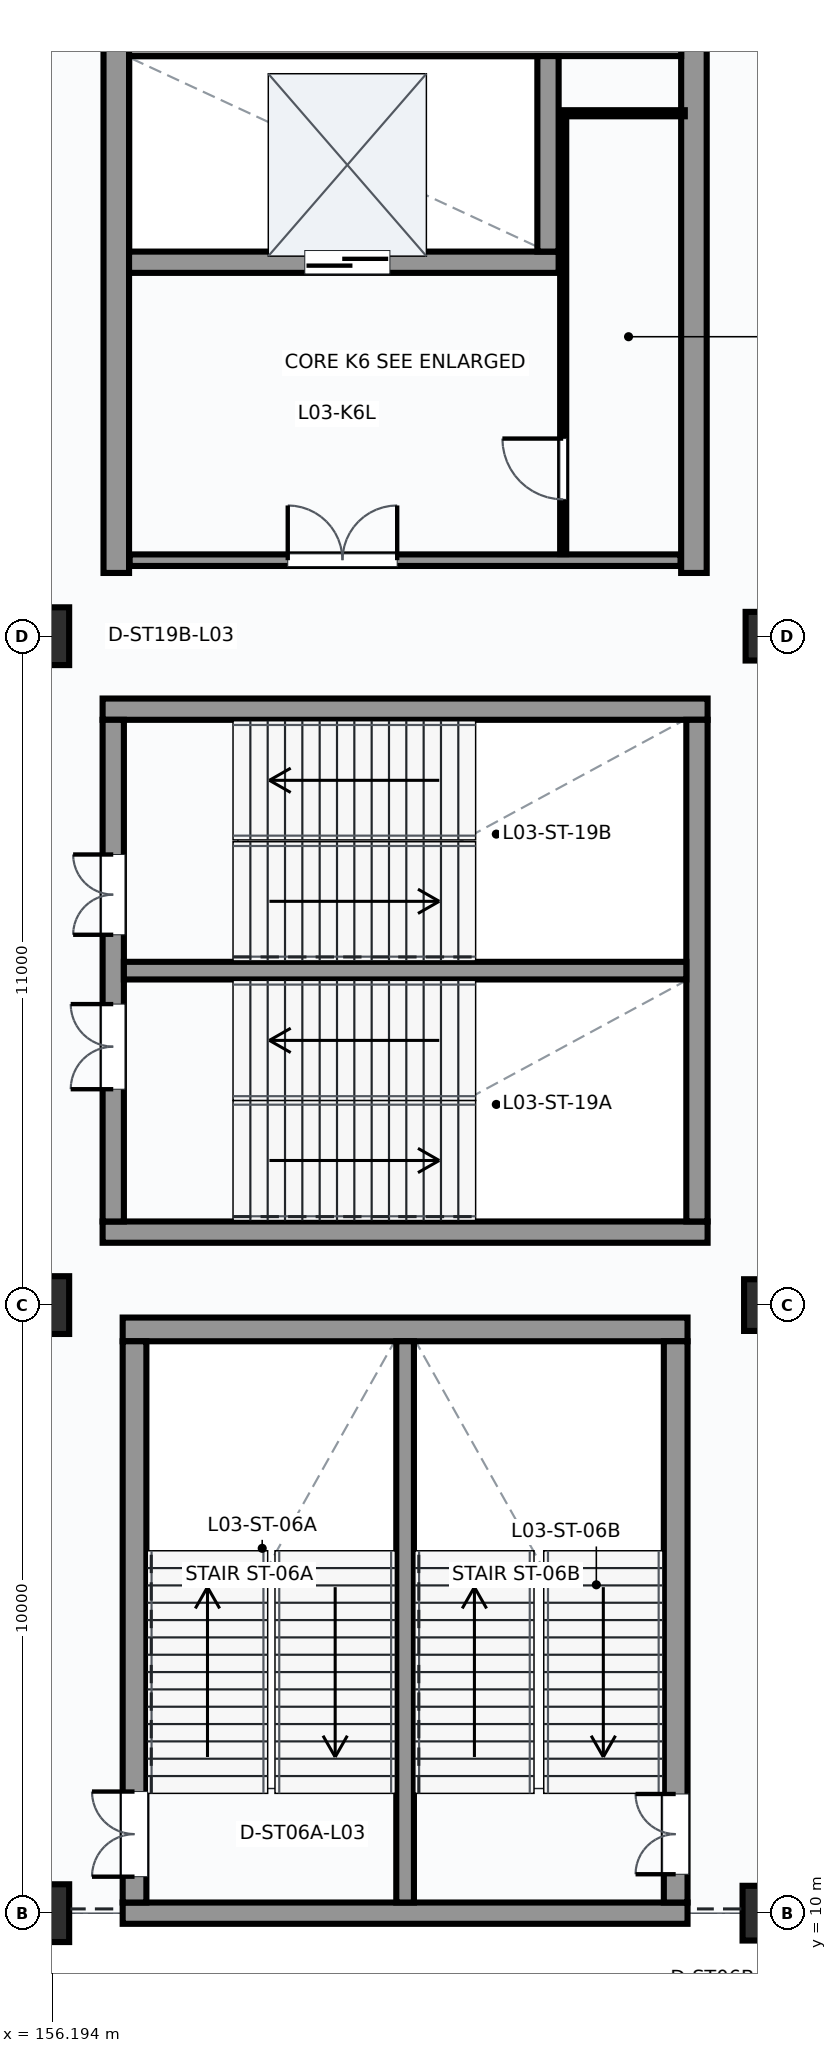
"""IFC4 building model, lengths in metres.
Left out: names, types, materials, properties, quantities, classifications, styles, units other than length and angle.
Written with IfcOpenShell. Run it as: python <this file> out.ifc"""

import sys

from ifc_helpers import new_model, si_unit, direction, frame, frame_2d, origin, origin_2d, place, context, subcontext, project, spatial, rectangle, extrude, element, fill, save


model = new_model("IFC4")
c1 = context("Model", 3, precision=1e-05, world=origin(), true_north=direction((0.0, 1.0)))
c2 = subcontext(c1, "Body", "Model", "MODEL_VIEW")
j1 = project(units=[si_unit("LENGTHUNIT", "METRE"), si_unit("PLANEANGLEUNIT", "RADIAN")], contexts=[c1])
p1 = place(None, origin())
s1 = spatial("IfcSite", under=j1, at=p1, CompositionType="ELEMENT")
p2 = place(p1, origin())
s2 = spatial("IfcBuilding", under=s1, at=p2, CompositionType="ELEMENT")
p3 = place(p2, frame((0.0, 0.0, 14.7)))
s3 = spatial("IfcBuildingStorey", under=s2, at=p3, CompositionType="ELEMENT", Elevation=14.7)
for number, where, z_axis, x_axis in (
    (1, (156.0, 10.0, 0.0), (0.0, 0.0, 1.0), (1.0, 0.0, 0.0)),
    (2, (156.0, 20.0, 0.0), (0.0, 0.0, 1.0), (1.0, 0.0, 0.0)),
    (3, (156.0, 31.0, 0.0), (0.0, 0.0, 1.0), (1.0, 0.0, 0.0)),
):
    element("IfcColumn", number, at=place(p3, frame(where, z_axis=z_axis, x_axis=x_axis)), inside=s3, PredefinedType="COLUMN", context=c2, shape_type="SweptSolid", body=[
        extrude(rectangle(XDim=0.95, YDim=0.95, at=origin_2d()), origin(), (0.0, 0.0, 1.0), 4.5),
    ])
p4 = place(p3, frame((168.0, 10.0, 0.0), z_axis=(0.0, 0.0, 1.0), x_axis=(1.0, 0.0, 0.0)))
e4 = element("IfcColumn", 4, at=p4, inside=s3, PredefinedType="COLUMN", context=c2, shape_type="SweptSolid", body=[
    extrude(rectangle(XDim=0.9, YDim=0.9, at=origin_2d()), origin(), (0.0, 0.0, 1.0), 4.5),
])
p5 = place(p3, frame((168.0, 20.0, 0.0), z_axis=(0.0, 0.0, 1.0), x_axis=(1.0, 0.0, 0.0)))
e5 = element("IfcColumn", 5, at=p5, inside=s3, PredefinedType="COLUMN", context=c2, shape_type="SweptSolid", body=[
    extrude(rectangle(XDim=0.85, YDim=0.85, at=origin_2d()), origin(), (0.0, 0.0, 1.0), 4.5),
])
p6 = place(p3, frame((168.0, 31.0, 0.0), z_axis=(0.0, 0.0, 1.0), x_axis=(1.0, 0.0, 0.0)))
e6 = element("IfcColumn", 6, at=p6, inside=s3, PredefinedType="COLUMN", context=c2, shape_type="SweptSolid", body=[
    extrude(rectangle(XDim=0.8, YDim=0.8, at=origin_2d()), origin(), (0.0, 0.0, 1.0), 4.5),
])
p7 = place(p3, frame((157.355, 10.0, 0.0), z_axis=(0.0, 0.0, 1.0), x_axis=(1.0, 0.0, 0.0)))
e7 = element("IfcWall", 7, at=p7, inside=s3, PredefinedType="SHEAR", context=c2, shape_type="SweptSolid", body=[
    extrude(rectangle(XDim=9.29, YDim=0.35, at=frame_2d((4.645, 0.0))), origin(), (0.0, 0.0, 1.0), 3.674),
])
p8 = place(p3, frame((157.355, 19.6, 0.0), z_axis=(0.0, 0.0, 1.0), x_axis=(1.0, 0.0, 0.0)))
e8 = element("IfcWall", 8, at=p8, inside=s3, PredefinedType="SHEAR", context=c2, shape_type="SweptSolid", body=[
    extrude(rectangle(XDim=9.29, YDim=0.39, at=frame_2d((4.645, 0.0))), origin(), (0.0, 0.0, 1.0), 4.5),
])
p9 = place(p3, frame((157.55, 10.175, 0.0), z_axis=(0.0, 0.0, 1.0), x_axis=(0.0, 1.0, 0.0)))
e9 = element("IfcWall", 9, at=p9, inside=s3, PredefinedType="SHEAR", context=c2, shape_type="SweptSolid", body=[
    extrude(rectangle(XDim=9.23, YDim=0.39, at=frame_2d((4.615, 0.0))), origin(), (0.0, 0.0, 1.0), 4.5),
])
p10 = place(p9, frame((0.425, 0.0, 0.0)))
e10 = element("IfcOpeningElement", 10, at=p10, cuts=e9, PredefinedType="OPENING", context=c2, shape_type="SweptSolid", body=[
    extrude(rectangle(XDim=1.4, YDim=2.2, at=frame_2d((0.7, 1.1))), frame((0.0, 0.205, 0.0), z_axis=(0.0, -1.0, 0.0), x_axis=(1.0, 0.0, 0.0)), (0.0, 0.0, 1.0), 0.41),
])
p11 = place(p3, frame((166.45, 10.175, 0.0), z_axis=(0.0, 0.0, 1.0), x_axis=(0.0, 1.0, 0.0)))
e11 = element("IfcWall", 11, at=p11, inside=s3, PredefinedType="SHEAR", context=c2, shape_type="SweptSolid", body=[
    extrude(rectangle(XDim=9.23, YDim=0.39, at=frame_2d((4.615, 0.0))), origin(), (0.0, 0.0, 1.0), 4.5),
])
p12 = place(p11, frame((0.465, 0.0, 0.0)))
e12 = element("IfcOpeningElement", 12, at=p12, cuts=e11, PredefinedType="OPENING", context=c2, shape_type="SweptSolid", body=[
    extrude(rectangle(XDim=1.32, YDim=2.2, at=frame_2d((0.66, 1.1))), frame((0.0, 0.205, 0.0), z_axis=(0.0, -1.0, 0.0), x_axis=(1.0, 0.0, 0.0)), (0.0, 0.0, 1.0), 0.41),
])
p13 = place(p3, frame((162.0, 10.175, 0.0), z_axis=(0.0, 0.0, 1.0), x_axis=(0.0, 1.0, 0.0)))
e13 = element("IfcWall", 13, at=p13, inside=s3, PredefinedType="SHEAR", context=c2, shape_type="SweptSolid", body=[
    extrude(rectangle(XDim=9.23, YDim=0.29, at=frame_2d((4.615, 0.0))), origin(), (0.0, 0.0, 1.0), 4.5),
])
for number, where, z_axis, x_axis in (
    (14, (157.025, 21.2, 0.0), (0.0, 0.0, 1.0), (1.0, 0.0, 0.0)),
    (15, (157.025, 29.8, 0.0), (0.0, 0.0, 1.0), (1.0, 0.0, 0.0)),
):
    element("IfcWall", number, at=place(p3, frame(where, z_axis=z_axis, x_axis=x_axis)), inside=s3, PredefinedType="SHEAR", context=c2, shape_type="SweptSolid", body=[
        extrude(rectangle(XDim=9.95, YDim=0.35, at=frame_2d((4.975, 0.0))), origin(), (0.0, 0.0, 1.0), 4.5),
    ])
p14 = place(p3, frame((157.2, 21.375, 0.0), z_axis=(0.0, 0.0, 1.0), x_axis=(0.0, 1.0, 0.0)))
e16 = element("IfcWall", 16, at=p14, inside=s3, PredefinedType="SHEAR", context=c2, shape_type="SweptSolid", body=[
    extrude(rectangle(XDim=8.25, YDim=0.35, at=frame_2d((4.125, 0.0))), origin(), (0.0, 0.0, 1.0), 4.5),
])
p15 = place(p14, frame((2.175, 0.0, 0.0)))
e17 = element("IfcOpeningElement", 17, at=p15, cuts=e16, PredefinedType="OPENING", context=c2, shape_type="SweptSolid", body=[
    extrude(rectangle(XDim=1.4, YDim=2.2, at=frame_2d((0.7, 1.1))), frame((0.0, 0.185, 0.0), z_axis=(0.0, -1.0, 0.0), x_axis=(1.0, 0.0, 0.0)), (0.0, 0.0, 1.0), 0.37),
])
p16 = place(p14, frame((4.715, 0.0, 0.0)))
e18 = element("IfcOpeningElement", 18, at=p16, cuts=e16, PredefinedType="OPENING", context=c2, shape_type="SweptSolid", body=[
    extrude(rectangle(XDim=1.32, YDim=2.2, at=frame_2d((0.66, 1.1))), frame((0.0, 0.185, 0.0), z_axis=(0.0, -1.0, 0.0), x_axis=(1.0, 0.0, 0.0)), (0.0, 0.0, 1.0), 0.37),
])
p17 = place(p3, frame((166.8, 21.375, 0.0), z_axis=(0.0, 0.0, 1.0), x_axis=(0.0, 1.0, 0.0)))
e19 = element("IfcWall", 19, at=p17, inside=s3, PredefinedType="SHEAR", context=c2, shape_type="SweptSolid", body=[
    extrude(rectangle(XDim=8.25, YDim=0.35, at=frame_2d((4.125, 0.0))), origin(), (0.0, 0.0, 1.0), 4.5),
])
p18 = place(p3, frame((157.375, 25.5, 0.0), z_axis=(0.0, 0.0, 1.0), x_axis=(1.0, 0.0, 0.0)))
e20 = element("IfcWall", 20, at=p18, inside=s3, PredefinedType="SHEAR", context=c2, shape_type="SweptSolid", body=[
    extrude(rectangle(XDim=9.25, YDim=0.29, at=frame_2d((4.625, 0.0))), origin(), (0.0, 0.0, 1.0), 4.5),
])
for number, where, z_axis, x_axis in (
    (21, (157.25, 32.04, 0.0), (0.0, 0.0, 1.0), (0.0, 1.0, 0.0)),
    (22, (166.75, 32.04, 0.0), (0.0, 0.0, 1.0), (0.0, 1.0, 0.0)),
):
    element("IfcWall", number, at=place(p3, frame(where, z_axis=z_axis, x_axis=x_axis)), inside=s3, PredefinedType="SHEAR", context=c2, shape_type="SweptSolid", body=[
        extrude(rectangle(XDim=8.92, YDim=0.42, at=frame_2d((4.46, 0.0))), origin(), (0.0, 0.0, 1.0), 4.5),
    ])
p19 = place(p3, frame((157.46, 40.75, 0.0), z_axis=(0.0, 0.0, 1.0), x_axis=(1.0, 0.0, 0.0)))
e23 = element("IfcWall", 23, at=p19, inside=s3, PredefinedType="SHEAR", context=c2, shape_type="SweptSolid", body=[
    extrude(rectangle(XDim=9.08, YDim=0.42, at=frame_2d((4.54, 0.0))), origin(), (0.0, 0.0, 1.0), 4.5),
])
p20 = place(p3, frame((157.46, 37.15, 0.0), z_axis=(0.0, 0.0, 1.0), x_axis=(1.0, 0.0, 0.0)))
e24 = element("IfcWall", 24, at=p20, inside=s3, PredefinedType="SHEAR", context=c2, shape_type="SweptSolid", body=[
    extrude(rectangle(XDim=7.065, YDim=0.35, at=frame_2d((3.532, 0.0))), origin(), (0.0, 0.0, 1.0), 4.5),
])
p21 = place(p20, frame((2.89, 0.0, 0.0)))
e25 = element("IfcOpeningElement", 25, at=p21, cuts=e24, PredefinedType="OPENING", context=c2, shape_type="SweptSolid", body=[
    extrude(rectangle(XDim=1.4, YDim=2.3, at=frame_2d((0.7, 1.15))), frame((0.0, 0.185, 0.0), z_axis=(0.0, -1.0, 0.0), x_axis=(1.0, 0.0, 0.0)), (0.0, 0.0, 1.0), 0.37),
])
p22 = place(p3, frame((164.35, 37.325, 0.0), z_axis=(0.0, 0.0, 1.0), x_axis=(0.0, 1.0, 0.0)))
e26 = element("IfcWall", 26, at=p22, inside=s3, PredefinedType="SHEAR", context=c2, shape_type="SweptSolid", body=[
    extrude(rectangle(XDim=3.215, YDim=0.35, at=frame_2d((1.607, 0.0))), origin(), (0.0, 0.0, 1.0), 4.5),
])
p23 = place(p3, frame((157.47, 32.25, 0.0), z_axis=(0.0, 0.0, 1.0), x_axis=(1.0, 0.0, 0.0)))
e27 = element("IfcWall", 27, at=p23, inside=s3, PredefinedType="PARTITIONING", context=c2, shape_type="SweptSolid", body=[
    extrude(rectangle(XDim=9.06, YDim=0.19, at=frame_2d((4.53, 0.0))), origin(), (0.0, 0.0, 1.0), 4.16),
])
p24 = place(p23, frame((2.6, 0.0, 0.0)))
e28 = element("IfcOpeningElement", 28, at=p24, cuts=e27, PredefinedType="OPENING", context=c2, shape_type="SweptSolid", body=[
    extrude(rectangle(XDim=1.8, YDim=2.3, at=frame_2d((0.9, 1.15))), frame((0.0, 0.105, 0.0), z_axis=(0.0, -1.0, 0.0), x_axis=(1.0, 0.0, 0.0)), (0.0, 0.0, 1.0), 0.21),
])
p25 = place(p3, frame((164.6, 32.35, 0.0), z_axis=(0.0, 0.0, 1.0), x_axis=(0.0, 1.0, 0.0)))
e29 = element("IfcWall", 29, at=p25, inside=s3, PredefinedType="PARTITIONING", context=c2, shape_type="SweptSolid", body=[
    extrude(rectangle(XDim=7.25, YDim=0.1, at=frame_2d((3.625, 0.0))), origin(), (0.0, 0.0, 1.0), 4.16),
])
p26 = place(p25, frame((0.9, 0.0, 0.0)))
e30 = element("IfcOpeningElement", 30, at=p26, cuts=e29, PredefinedType="OPENING", context=c2, shape_type="SweptSolid", body=[
    extrude(rectangle(XDim=1.0, YDim=2.1, at=frame_2d((0.5, 1.05))), frame((0.0, 0.06, 0.0), z_axis=(0.0, -1.0, 0.0), x_axis=(1.0, 0.0, 0.0)), (0.0, 0.0, 1.0), 0.12),
])
p27 = place(p3, frame((164.6, 39.6, 0.0), z_axis=(0.0, 0.0, 1.0), x_axis=(1.0, 0.0, 0.0)))
e31 = element("IfcWall", 31, at=p27, inside=s3, PredefinedType="PARTITIONING", context=c2, shape_type="SweptSolid", body=[
    extrude(rectangle(XDim=2.0, YDim=0.1, at=frame_2d((1.0, 0.0))), origin(), (0.0, 0.0, 1.0), 4.16),
])
p28 = place(p10, frame((1.4, 0.0, 0.0), z_axis=(0.0, 0.0, 1.0), x_axis=(-1.0, 0.0, 0.0)))
e32 = element("IfcDoor", 32, at=p28, inside=s3, OperationType="DOUBLE_DOOR_SINGLE_SWING", PredefinedType="DOOR", context=c2, shape_type="SweptSolid", body=[
    extrude(rectangle(XDim=1.4, YDim=2.2, at=frame_2d((0.7, 1.1))), frame((0.0, 0.025, 0.0), z_axis=(0.0, -1.0, 0.0), x_axis=(1.0, 0.0, 0.0)), (0.0, 0.0, 1.0), 0.05),
])
fill(e10, e32)
p29 = place(p12, origin())
e33 = element("IfcDoor", 33, at=p29, inside=s3, OperationType="DOUBLE_DOOR_SINGLE_SWING", PredefinedType="DOOR", context=c2, shape_type="SweptSolid", body=[
    extrude(rectangle(XDim=1.32, YDim=2.2, at=frame_2d((0.66, 1.1))), frame((0.0, 0.025, 0.0), z_axis=(0.0, -1.0, 0.0), x_axis=(1.0, 0.0, 0.0)), (0.0, 0.0, 1.0), 0.05),
])
fill(e12, e33)
p30 = place(p15, origin())
e34 = element("IfcDoor", 34, at=p30, inside=s3, OperationType="DOUBLE_DOOR_SINGLE_SWING", PredefinedType="DOOR", context=c2, shape_type="SweptSolid", body=[
    extrude(rectangle(XDim=1.4, YDim=2.2, at=frame_2d((0.7, 1.1))), frame((0.0, 0.025, 0.0), z_axis=(0.0, -1.0, 0.0), x_axis=(1.0, 0.0, 0.0)), (0.0, 0.0, 1.0), 0.05),
])
fill(e17, e34)
p31 = place(p16, origin())
e35 = element("IfcDoor", 35, at=p31, inside=s3, OperationType="DOUBLE_DOOR_SINGLE_SWING", PredefinedType="DOOR", context=c2, shape_type="SweptSolid", body=[
    extrude(rectangle(XDim=1.32, YDim=2.2, at=frame_2d((0.66, 1.1))), frame((0.0, 0.025, 0.0), z_axis=(0.0, -1.0, 0.0), x_axis=(1.0, 0.0, 0.0)), (0.0, 0.0, 1.0), 0.05),
])
fill(e18, e35)
p32 = place(p21, origin())
e36 = element("IfcDoor", 36, at=p32, inside=s3, OperationType="SLIDING_TO_LEFT", PredefinedType="DOOR", context=c2, shape_type="SweptSolid", body=[
    extrude(rectangle(XDim=1.4, YDim=2.3, at=frame_2d((0.7, 1.15))), frame((0.0, 0.025, 0.0), z_axis=(0.0, -1.0, 0.0), x_axis=(1.0, 0.0, 0.0)), (0.0, 0.0, 1.0), 0.05),
])
fill(e25, e36)
p33 = place(p24, origin())
e37 = element("IfcDoor", 37, at=p33, inside=s3, OperationType="DOUBLE_DOOR_SINGLE_SWING", PredefinedType="DOOR", context=c2, shape_type="SweptSolid", body=[
    extrude(rectangle(XDim=1.8, YDim=2.3, at=frame_2d((0.9, 1.15))), frame((0.0, 0.025, 0.0), z_axis=(0.0, -1.0, 0.0), x_axis=(1.0, 0.0, 0.0)), (0.0, 0.0, 1.0), 0.05),
])
fill(e28, e37)
p34 = place(p26, origin())
e38 = element("IfcDoor", 38, at=p34, inside=s3, OperationType="SINGLE_SWING_RIGHT", PredefinedType="DOOR", context=c2, shape_type="SweptSolid", body=[
    extrude(rectangle(XDim=1.0, YDim=2.1, at=frame_2d((0.5, 1.05))), frame((0.0, 0.025, 0.0), z_axis=(0.0, -1.0, 0.0), x_axis=(1.0, 0.0, 0.0)), (0.0, 0.0, 1.0), 0.05),
])
fill(e30, e38)
save(model, sys.argv[1])
